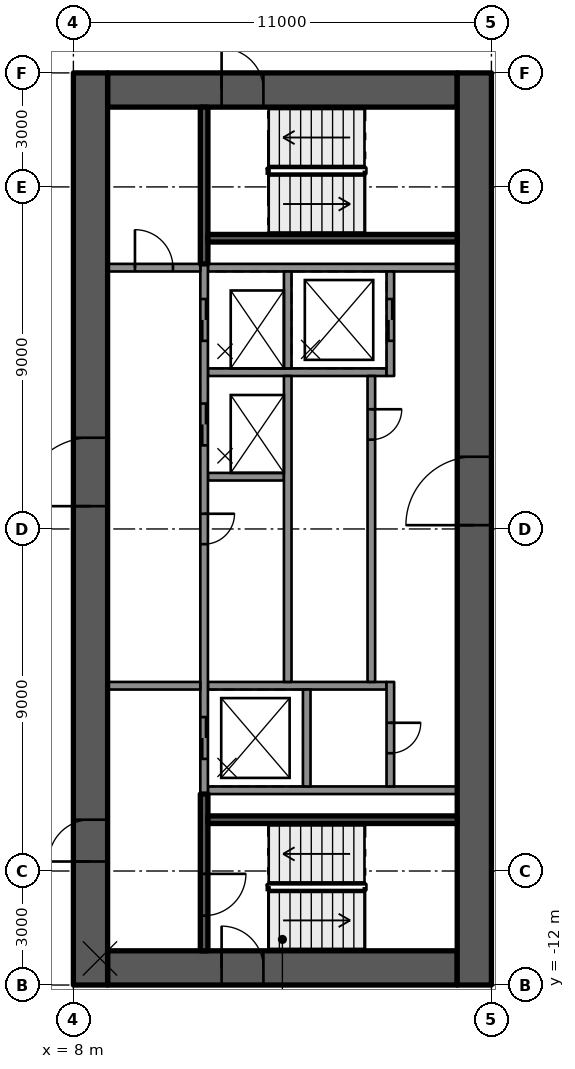
"""IFC4 building model, lengths in metres.
Left out: names, types, materials, properties, quantities, classifications, styles, units other than length and angle.
Written with IfcOpenShell. Run it as: python <this file> out.ifc"""

import sys

from ifc_helpers import new_model, si_unit, direction, frame, frame_2d, origin, place, context, subcontext, project, spatial, rectangle, extrude, element, fill, save


model = new_model("IFC4")
c1 = context("Model", 3, precision=1e-05, world=origin(), true_north=direction((0.0, 1.0)))
c2 = subcontext(c1, "Body", "Model", "MODEL_VIEW")
j1 = project(units=[si_unit("LENGTHUNIT", "METRE"), si_unit("PLANEANGLEUNIT", "RADIAN")], contexts=[c1])
p1 = place(None, origin())
s1 = spatial("IfcSite", under=j1, at=p1, CompositionType="ELEMENT")
p2 = place(p1, origin())
s2 = spatial("IfcBuilding", under=s1, at=p2, CompositionType="ELEMENT")
p3 = place(p2, frame((0.0, 0.0, 217.5)))
s3 = spatial("IfcBuildingStorey", under=s2, at=p3, CompositionType="ELEMENT", Elevation=217.5)
p4 = place(p3, frame((8.9, 11.55, 0.0), z_axis=(0.0, 0.0, 1.0), x_axis=(1.0, 0.0, 0.0)))
e1 = element("IfcWall", 1, at=p4, inside=s3, PredefinedType="SHEAR", context=c2, shape_type="SweptSolid", body=[
    extrude(rectangle(XDim=9.2, YDim=0.9, at=frame_2d((4.6, 0.0))), origin(), (0.0, 0.0, 1.0), 3.5),
])
p5 = place(p4, frame((3.0, 0.0, 0.0)))
e2 = element("IfcOpeningElement", 2, at=p5, cuts=e1, PredefinedType="OPENING", context=c2, shape_type="SweptSolid", body=[
    extrude(rectangle(XDim=1.1, YDim=2.1, at=frame_2d((0.55, 1.05))), frame((0.0, 0.46, 0.0), z_axis=(0.0, -1.0, 0.0), x_axis=(1.0, 0.0, 0.0)), (0.0, 0.0, 1.0), 0.92),
])
p6 = place(p3, frame((8.9, -11.55, 0.0), z_axis=(0.0, 0.0, 1.0), x_axis=(1.0, 0.0, 0.0)))
e3 = element("IfcWall", 3, at=p6, inside=s3, PredefinedType="SHEAR", context=c2, shape_type="SweptSolid", body=[
    extrude(rectangle(XDim=9.2, YDim=0.9, at=frame_2d((4.6, 0.0))), origin(), (0.0, 0.0, 1.0), 3.5),
])
p7 = place(p6, frame((3.0, 0.0, 0.0)))
e4 = element("IfcOpeningElement", 4, at=p7, cuts=e3, PredefinedType="OPENING", context=c2, shape_type="SweptSolid", body=[
    extrude(rectangle(XDim=1.1, YDim=2.1, at=frame_2d((0.55, 1.05))), frame((0.0, 0.46, 0.0), z_axis=(0.0, -1.0, 0.0), x_axis=(1.0, 0.0, 0.0)), (0.0, 0.0, 1.0), 0.92),
])
p8 = place(p3, frame((8.45, -12.0, 0.0), z_axis=(0.0, 0.0, 1.0), x_axis=(0.0, 1.0, 0.0)))
e5 = element("IfcWall", 5, at=p8, inside=s3, PredefinedType="SHEAR", context=c2, shape_type="SweptSolid", body=[
    extrude(rectangle(XDim=24.0, YDim=0.9, at=frame_2d((12.0, 0.0))), origin(), (0.0, 0.0, 1.0), 3.5),
])
p9 = place(p8, frame((12.6, 0.0, 0.0)))
e6 = element("IfcOpeningElement", 6, at=p9, cuts=e5, PredefinedType="OPENING", context=c2, shape_type="SweptSolid", body=[
    extrude(rectangle(XDim=1.8, YDim=2.1, at=frame_2d((0.9, 1.05))), frame((0.0, 0.46, 0.0), z_axis=(0.0, -1.0, 0.0), x_axis=(1.0, 0.0, 0.0)), (0.0, 0.0, 1.0), 0.92),
])
p10 = place(p8, frame((3.25, 0.0, 0.0)))
e7 = element("IfcOpeningElement", 7, at=p10, cuts=e5, PredefinedType="OPENING", context=c2, shape_type="SweptSolid", body=[
    extrude(rectangle(XDim=1.1, YDim=2.1, at=frame_2d((0.55, 1.05))), frame((0.0, 0.46, 0.0), z_axis=(0.0, -1.0, 0.0), x_axis=(1.0, 0.0, 0.0)), (0.0, 0.0, 1.0), 0.92),
])
p11 = place(p3, frame((18.55, -12.0, 0.0), z_axis=(0.0, 0.0, 1.0), x_axis=(0.0, 1.0, 0.0)))
e8 = element("IfcWall", 8, at=p11, inside=s3, PredefinedType="SHEAR", context=c2, shape_type="SweptSolid", body=[
    extrude(rectangle(XDim=24.0, YDim=0.9, at=frame_2d((12.0, 0.0))), origin(), (0.0, 0.0, 1.0), 3.5),
])
p12 = place(p11, frame((12.1, 0.0, 0.0)))
e9 = element("IfcOpeningElement", 9, at=p12, cuts=e8, PredefinedType="OPENING", context=c2, shape_type="SweptSolid", body=[
    extrude(rectangle(XDim=1.8, YDim=2.1, at=frame_2d((0.9, 1.05))), frame((0.0, 0.46, 0.0), z_axis=(0.0, -1.0, 0.0), x_axis=(1.0, 0.0, 0.0)), (0.0, 0.0, 1.0), 0.92),
])
for number, where, z_axis, x_axis in (
    (10, (11.54, -6.875, 0.0), (0.0, 0.0, 1.0), (1.0, 0.0, 0.0)),
    (11, (11.54, 6.875, 0.0), (0.0, 0.0, 1.0), (1.0, 0.0, 0.0)),
):
    element("IfcWall", number, at=place(p3, frame(where, z_axis=z_axis, x_axis=x_axis)), inside=s3, PredefinedType="SOLIDWALL", context=c2, shape_type="SweptSolid", body=[
        extrude(rectangle(XDim=6.56, YDim=0.2, at=frame_2d((3.28, 0.0))), origin(), (0.0, 0.0, 1.0), 3.08),
    ])
p13 = place(p3, frame((11.54, 4.125, 0.0), z_axis=(0.0, 0.0, 1.0), x_axis=(1.0, 0.0, 0.0)))
e12 = element("IfcWall", 12, at=p13, inside=s3, PredefinedType="SOLIDWALL", context=c2, shape_type="SweptSolid", body=[
    extrude(rectangle(XDim=4.7, YDim=0.2, at=frame_2d((2.35, 0.0))), origin(), (0.0, 0.0, 1.0), 3.08),
])
p14 = place(p3, frame((11.54, 1.375, 0.0), z_axis=(0.0, 0.0, 1.0), x_axis=(1.0, 0.0, 0.0)))
e13 = element("IfcWall", 13, at=p14, inside=s3, PredefinedType="SOLIDWALL", context=c2, shape_type="SweptSolid", body=[
    extrude(rectangle(XDim=2.0, YDim=0.2, at=frame_2d((1.0, 0.0))), origin(), (0.0, 0.0, 1.0), 3.08),
])
p15 = place(p3, frame((11.54, -4.125, 0.0), z_axis=(0.0, 0.0, 1.0), x_axis=(1.0, 0.0, 0.0)))
e14 = element("IfcWall", 14, at=p15, inside=s3, PredefinedType="SOLIDWALL", context=c2, shape_type="SweptSolid", body=[
    extrude(rectangle(XDim=4.7, YDim=0.2, at=frame_2d((2.35, 0.0))), origin(), (0.0, 0.0, 1.0), 3.08),
])
p16 = place(p3, frame((11.44, 6.975, 0.0), z_axis=(0.0, 0.0, 1.0), x_axis=(0.0, -1.0, 0.0)))
e15 = element("IfcWall", 15, at=p16, inside=s3, PredefinedType="SOLIDWALL", context=c2, shape_type="SweptSolid", body=[
    extrude(rectangle(XDim=13.95, YDim=0.2, at=frame_2d((6.975, 0.0))), origin(), (0.0, 0.0, 1.0), 3.08),
])
p17 = place(p16, frame((0.925, 0.0, 0.0)))
e16 = element("IfcOpeningElement", 16, at=p17, cuts=e15, PredefinedType="OPENING", context=c2, shape_type="SweptSolid", body=[
    extrude(rectangle(XDim=1.1, YDim=2.1, at=frame_2d((0.55, 1.05))), frame((0.0, 0.11, 0.0), z_axis=(0.0, -1.0, 0.0), x_axis=(1.0, 0.0, 0.0)), (0.0, 0.0, 1.0), 0.22),
])
p18 = place(p16, frame((3.675, 0.0, 0.0)))
e17 = element("IfcOpeningElement", 17, at=p18, cuts=e15, PredefinedType="OPENING", context=c2, shape_type="SweptSolid", body=[
    extrude(rectangle(XDim=1.1, YDim=2.1, at=frame_2d((0.55, 1.05))), frame((0.0, 0.11, 0.0), z_axis=(0.0, -1.0, 0.0), x_axis=(1.0, 0.0, 0.0)), (0.0, 0.0, 1.0), 0.22),
])
p19 = place(p16, frame((11.925, 0.0, 0.0)))
e18 = element("IfcOpeningElement", 18, at=p19, cuts=e15, PredefinedType="OPENING", context=c2, shape_type="SweptSolid", body=[
    extrude(rectangle(XDim=1.1, YDim=2.1, at=frame_2d((0.55, 1.05))), frame((0.0, 0.11, 0.0), z_axis=(0.0, -1.0, 0.0), x_axis=(1.0, 0.0, 0.0)), (0.0, 0.0, 1.0), 0.22),
])
p20 = place(p16, frame((6.575, 0.0, 0.0)))
e19 = element("IfcOpeningElement", 19, at=p20, cuts=e15, PredefinedType="OPENING", context=c2, shape_type="SweptSolid", body=[
    extrude(rectangle(XDim=0.8, YDim=2.1, at=frame_2d((0.4, 1.05))), frame((0.0, 0.11, 0.0), z_axis=(0.0, -1.0, 0.0), x_axis=(1.0, 0.0, 0.0)), (0.0, 0.0, 1.0), 0.22),
])
p21 = place(p3, frame((13.64, 6.775, 0.0), z_axis=(0.0, 0.0, 1.0), x_axis=(0.0, -1.0, 0.0)))
e20 = element("IfcWall", 20, at=p21, inside=s3, PredefinedType="SOLIDWALL", context=c2, shape_type="SweptSolid", body=[
    extrude(rectangle(XDim=2.55, YDim=0.2, at=frame_2d((1.275, 0.0))), origin(), (0.0, 0.0, 1.0), 3.08),
])
p22 = place(p3, frame((13.64, 4.025, 0.0), z_axis=(0.0, 0.0, 1.0), x_axis=(0.0, -1.0, 0.0)))
e21 = element("IfcWall", 21, at=p22, inside=s3, PredefinedType="SOLIDWALL", context=c2, shape_type="SweptSolid", body=[
    extrude(rectangle(XDim=8.05, YDim=0.2, at=frame_2d((4.025, 0.0))), origin(), (0.0, 0.0, 1.0), 3.08),
])
p23 = place(p3, frame((14.14, -4.225, 0.0), z_axis=(0.0, 0.0, 1.0), x_axis=(0.0, -1.0, 0.0)))
e22 = element("IfcWall", 22, at=p23, inside=s3, PredefinedType="SOLIDWALL", context=c2, shape_type="SweptSolid", body=[
    extrude(rectangle(XDim=2.55, YDim=0.2, at=frame_2d((1.275, 0.0))), origin(), (0.0, 0.0, 1.0), 3.08),
])
p24 = place(p3, frame((16.34, 6.775, 0.0), z_axis=(0.0, 0.0, 1.0), x_axis=(0.0, -1.0, 0.0)))
e23 = element("IfcWall", 23, at=p24, inside=s3, PredefinedType="SOLIDWALL", context=c2, shape_type="SweptSolid", body=[
    extrude(rectangle(XDim=2.75, YDim=0.2, at=frame_2d((1.375, 0.0))), origin(), (0.0, 0.0, 1.0), 3.08),
])
p25 = place(p24, frame((0.725, 0.0, 0.0)))
e24 = element("IfcOpeningElement", 24, at=p25, cuts=e23, PredefinedType="OPENING", context=c2, shape_type="SweptSolid", body=[
    extrude(rectangle(XDim=1.1, YDim=2.1, at=frame_2d((0.55, 1.05))), frame((0.0, 0.11, 0.0), z_axis=(0.0, -1.0, 0.0), x_axis=(1.0, 0.0, 0.0)), (0.0, 0.0, 1.0), 0.22),
])
p26 = place(p3, frame((15.84, 4.025, 0.0), z_axis=(0.0, 0.0, 1.0), x_axis=(0.0, -1.0, 0.0)))
e25 = element("IfcWall", 25, at=p26, inside=s3, PredefinedType="SOLIDWALL", context=c2, shape_type="SweptSolid", body=[
    extrude(rectangle(XDim=8.05, YDim=0.2, at=frame_2d((4.025, 0.0))), origin(), (0.0, 0.0, 1.0), 3.08),
])
p27 = place(p26, frame((0.875, 0.0, 0.0)))
e26 = element("IfcOpeningElement", 26, at=p27, cuts=e25, PredefinedType="OPENING", context=c2, shape_type="SweptSolid", body=[
    extrude(rectangle(XDim=0.8, YDim=2.1, at=frame_2d((0.4, 1.05))), frame((0.0, 0.11, 0.0), z_axis=(0.0, -1.0, 0.0), x_axis=(1.0, 0.0, 0.0)), (0.0, 0.0, 1.0), 0.22),
])
p28 = place(p3, frame((16.34, -4.025, 0.0), z_axis=(0.0, 0.0, 1.0), x_axis=(0.0, -1.0, 0.0)))
e27 = element("IfcWall", 27, at=p28, inside=s3, PredefinedType="SOLIDWALL", context=c2, shape_type="SweptSolid", body=[
    extrude(rectangle(XDim=2.75, YDim=0.2, at=frame_2d((1.375, 0.0))), origin(), (0.0, 0.0, 1.0), 3.08),
])
p29 = place(p28, frame((1.075, 0.0, 0.0)))
e28 = element("IfcOpeningElement", 28, at=p29, cuts=e27, PredefinedType="OPENING", context=c2, shape_type="SweptSolid", body=[
    extrude(rectangle(XDim=0.8, YDim=2.1, at=frame_2d((0.4, 1.05))), frame((0.0, 0.11, 0.0), z_axis=(0.0, -1.0, 0.0), x_axis=(1.0, 0.0, 0.0)), (0.0, 0.0, 1.0), 0.22),
])
p30 = place(p3, frame((11.44, -6.975, 0.0), z_axis=(0.0, 0.0, 1.0), x_axis=(0.0, -1.0, 0.0)))
e29 = element("IfcWall", 29, at=p30, inside=s3, PredefinedType="SOLIDWALL", context=c2, shape_type="SweptSolid", body=[
    extrude(rectangle(XDim=4.125, YDim=0.2, at=frame_2d((2.062, 0.0))), origin(), (0.0, 0.0, 1.0), 3.08),
])
p31 = place(p30, frame((2.1, 0.0, 0.0)))
e30 = element("IfcOpeningElement", 30, at=p31, cuts=e29, PredefinedType="OPENING", context=c2, shape_type="SweptSolid", body=[
    extrude(rectangle(XDim=1.1, YDim=2.1, at=frame_2d((0.55, 1.05))), frame((0.0, 0.11, 0.0), z_axis=(0.0, -1.0, 0.0), x_axis=(1.0, 0.0, 0.0)), (0.0, 0.0, 1.0), 0.22),
])
p32 = place(p3, frame((11.54, -7.65, 0.0), z_axis=(0.0, 0.0, 1.0), x_axis=(1.0, 0.0, 0.0)))
e31 = element("IfcWall", 31, at=p32, inside=s3, PredefinedType="SOLIDWALL", context=c2, shape_type="SweptSolid", body=[
    extrude(rectangle(XDim=6.56, YDim=0.2, at=frame_2d((3.28, 0.0))), origin(), (0.0, 0.0, 1.0), 3.08),
])
p33 = place(p3, frame((11.44, 11.1, 0.0), z_axis=(0.0, 0.0, 1.0), x_axis=(0.0, -1.0, 0.0)))
e32 = element("IfcWall", 32, at=p33, inside=s3, PredefinedType="SOLIDWALL", context=c2, shape_type="SweptSolid", body=[
    extrude(rectangle(XDim=4.125, YDim=0.2, at=frame_2d((2.062, 0.0))), origin(), (0.0, 0.0, 1.0), 3.08),
])
p34 = place(p3, frame((11.54, 7.65, 0.0), z_axis=(0.0, 0.0, 1.0), x_axis=(1.0, 0.0, 0.0)))
e33 = element("IfcWall", 33, at=p34, inside=s3, PredefinedType="SOLIDWALL", context=c2, shape_type="SweptSolid", body=[
    extrude(rectangle(XDim=6.56, YDim=0.2, at=frame_2d((3.28, 0.0))), origin(), (0.0, 0.0, 1.0), 3.08),
])
p35 = place(p3, frame((8.9, -4.125, 0.0), z_axis=(0.0, 0.0, 1.0), x_axis=(1.0, 0.0, 0.0)))
e34 = element("IfcWall", 34, at=p35, inside=s3, PredefinedType="PARTITIONING", context=c2, shape_type="SweptSolid", body=[
    extrude(rectangle(XDim=2.44, YDim=0.2, at=frame_2d((1.22, 0.0))), origin(), (0.0, 0.0, 1.0), 3.08),
])
p36 = place(p3, frame((8.9, 6.875, 0.0), z_axis=(0.0, 0.0, 1.0), x_axis=(1.0, 0.0, 0.0)))
e35 = element("IfcWall", 35, at=p36, inside=s3, PredefinedType="PARTITIONING", context=c2, shape_type="SweptSolid", body=[
    extrude(rectangle(XDim=2.44, YDim=0.2, at=frame_2d((1.22, 0.0))), origin(), (0.0, 0.0, 1.0), 3.08),
])
p37 = place(p36, frame((0.72, 0.0, 0.0)))
e36 = element("IfcOpeningElement", 36, at=p37, cuts=e35, PredefinedType="OPENING", context=c2, shape_type="SweptSolid", body=[
    extrude(rectangle(XDim=1.0, YDim=2.1, at=frame_2d((0.5, 1.05))), frame((0.0, 0.11, 0.0), z_axis=(0.0, -1.0, 0.0), x_axis=(1.0, 0.0, 0.0)), (0.0, 0.0, 1.0), 0.22),
])
p38 = place(p17, origin())
e37 = element("IfcDoor", 37, at=p38, inside=s3, OperationType="DOUBLE_DOOR_SLIDING", PredefinedType="DOOR", context=c2, shape_type="SweptSolid", body=[
    extrude(rectangle(XDim=1.1, YDim=2.1, at=frame_2d((0.55, 1.05))), frame((0.0, 0.025, 0.0), z_axis=(0.0, -1.0, 0.0), x_axis=(1.0, 0.0, 0.0)), (0.0, 0.0, 1.0), 0.05),
])
fill(e16, e37)
p39 = place(p25, origin())
e38 = element("IfcDoor", 38, at=p39, inside=s3, OperationType="DOUBLE_DOOR_SLIDING", PredefinedType="DOOR", context=c2, shape_type="SweptSolid", body=[
    extrude(rectangle(XDim=1.1, YDim=2.1, at=frame_2d((0.55, 1.05))), frame((0.0, 0.025, 0.0), z_axis=(0.0, -1.0, 0.0), x_axis=(1.0, 0.0, 0.0)), (0.0, 0.0, 1.0), 0.05),
])
fill(e24, e38)
p40 = place(p18, origin())
e39 = element("IfcDoor", 39, at=p40, inside=s3, OperationType="DOUBLE_DOOR_SLIDING", PredefinedType="DOOR", context=c2, shape_type="SweptSolid", body=[
    extrude(rectangle(XDim=1.1, YDim=2.1, at=frame_2d((0.55, 1.05))), frame((0.0, 0.025, 0.0), z_axis=(0.0, -1.0, 0.0), x_axis=(1.0, 0.0, 0.0)), (0.0, 0.0, 1.0), 0.05),
])
fill(e17, e39)
p41 = place(p19, origin())
e40 = element("IfcDoor", 40, at=p41, inside=s3, OperationType="DOUBLE_DOOR_SLIDING", PredefinedType="DOOR", context=c2, shape_type="SweptSolid", body=[
    extrude(rectangle(XDim=1.1, YDim=2.1, at=frame_2d((0.55, 1.05))), frame((0.0, 0.025, 0.0), z_axis=(0.0, -1.0, 0.0), x_axis=(1.0, 0.0, 0.0)), (0.0, 0.0, 1.0), 0.05),
])
fill(e18, e40)
p42 = place(p27, origin())
e41 = element("IfcDoor", 41, at=p42, inside=s3, OperationType="SINGLE_SWING_LEFT", PredefinedType="DOOR", context=c2, shape_type="SweptSolid", body=[
    extrude(rectangle(XDim=0.8, YDim=2.1, at=frame_2d((0.4, 1.05))), frame((0.0, 0.025, 0.0), z_axis=(0.0, -1.0, 0.0), x_axis=(1.0, 0.0, 0.0)), (0.0, 0.0, 1.0), 0.05),
])
fill(e26, e41)
p43 = place(p20, origin())
e42 = element("IfcDoor", 42, at=p43, inside=s3, OperationType="SINGLE_SWING_LEFT", PredefinedType="DOOR", context=c2, shape_type="SweptSolid", body=[
    extrude(rectangle(XDim=0.8, YDim=2.1, at=frame_2d((0.4, 1.05))), frame((0.0, 0.025, 0.0), z_axis=(0.0, -1.0, 0.0), x_axis=(1.0, 0.0, 0.0)), (0.0, 0.0, 1.0), 0.05),
])
fill(e19, e42)
p44 = place(p29, origin())
e43 = element("IfcDoor", 43, at=p44, inside=s3, OperationType="SINGLE_SWING_LEFT", PredefinedType="DOOR", context=c2, shape_type="SweptSolid", body=[
    extrude(rectangle(XDim=0.8, YDim=2.1, at=frame_2d((0.4, 1.05))), frame((0.0, 0.025, 0.0), z_axis=(0.0, -1.0, 0.0), x_axis=(1.0, 0.0, 0.0)), (0.0, 0.0, 1.0), 0.05),
])
fill(e28, e43)
p45 = place(p9, origin())
e44 = element("IfcDoor", 44, at=p45, inside=s3, OperationType="SINGLE_SWING_RIGHT", PredefinedType="DOOR", context=c2, shape_type="SweptSolid", body=[
    extrude(rectangle(XDim=1.8, YDim=2.1, at=frame_2d((0.9, 1.05))), frame((0.0, 0.025, 0.0), z_axis=(0.0, -1.0, 0.0), x_axis=(1.0, 0.0, 0.0)), (0.0, 0.0, 1.0), 0.05),
])
fill(e6, e44)
p46 = place(p12, origin())
e45 = element("IfcDoor", 45, at=p46, inside=s3, OperationType="SINGLE_SWING_RIGHT", PredefinedType="DOOR", context=c2, shape_type="SweptSolid", body=[
    extrude(rectangle(XDim=1.8, YDim=2.1, at=frame_2d((0.9, 1.05))), frame((0.0, 0.025, 0.0), z_axis=(0.0, -1.0, 0.0), x_axis=(1.0, 0.0, 0.0)), (0.0, 0.0, 1.0), 0.05),
])
fill(e9, e45)
p47 = place(p10, origin())
e46 = element("IfcDoor", 46, at=p47, inside=s3, OperationType="SINGLE_SWING_LEFT", PredefinedType="DOOR", context=c2, shape_type="SweptSolid", body=[
    extrude(rectangle(XDim=1.1, YDim=2.1, at=frame_2d((0.55, 1.05))), frame((0.0, 0.025, 0.0), z_axis=(0.0, -1.0, 0.0), x_axis=(1.0, 0.0, 0.0)), (0.0, 0.0, 1.0), 0.05),
])
fill(e7, e46)
p48 = place(p7, origin())
e47 = element("IfcDoor", 47, at=p48, inside=s3, OperationType="SINGLE_SWING_LEFT", PredefinedType="DOOR", context=c2, shape_type="SweptSolid", body=[
    extrude(rectangle(XDim=1.1, YDim=2.1, at=frame_2d((0.55, 1.05))), frame((0.0, 0.025, 0.0), z_axis=(0.0, -1.0, 0.0), x_axis=(1.0, 0.0, 0.0)), (0.0, 0.0, 1.0), 0.05),
])
fill(e4, e47)
p49 = place(p5, origin())
e48 = element("IfcDoor", 48, at=p49, inside=s3, OperationType="SINGLE_SWING_LEFT", PredefinedType="DOOR", context=c2, shape_type="SweptSolid", body=[
    extrude(rectangle(XDim=1.1, YDim=2.1, at=frame_2d((0.55, 1.05))), frame((0.0, 0.025, 0.0), z_axis=(0.0, -1.0, 0.0), x_axis=(1.0, 0.0, 0.0)), (0.0, 0.0, 1.0), 0.05),
])
fill(e2, e48)
p50 = place(p31, origin())
e49 = element("IfcDoor", 49, at=p50, inside=s3, OperationType="SINGLE_SWING_RIGHT", PredefinedType="DOOR", context=c2, shape_type="SweptSolid", body=[
    extrude(rectangle(XDim=1.1, YDim=2.1, at=frame_2d((0.55, 1.05))), frame((0.0, 0.025, 0.0), z_axis=(0.0, -1.0, 0.0), x_axis=(1.0, 0.0, 0.0)), (0.0, 0.0, 1.0), 0.05),
])
fill(e30, e49)
p51 = place(p37, origin())
e50 = element("IfcDoor", 50, at=p51, inside=s3, OperationType="SINGLE_SWING_RIGHT", PredefinedType="DOOR", context=c2, shape_type="SweptSolid", body=[
    extrude(rectangle(XDim=1.0, YDim=2.1, at=frame_2d((0.5, 1.05))), frame((0.0, 0.025, 0.0), z_axis=(0.0, -1.0, 0.0), x_axis=(1.0, 0.0, 0.0)), (0.0, 0.0, 1.0), 0.05),
])
fill(e36, e50)
save(model, sys.argv[1])
